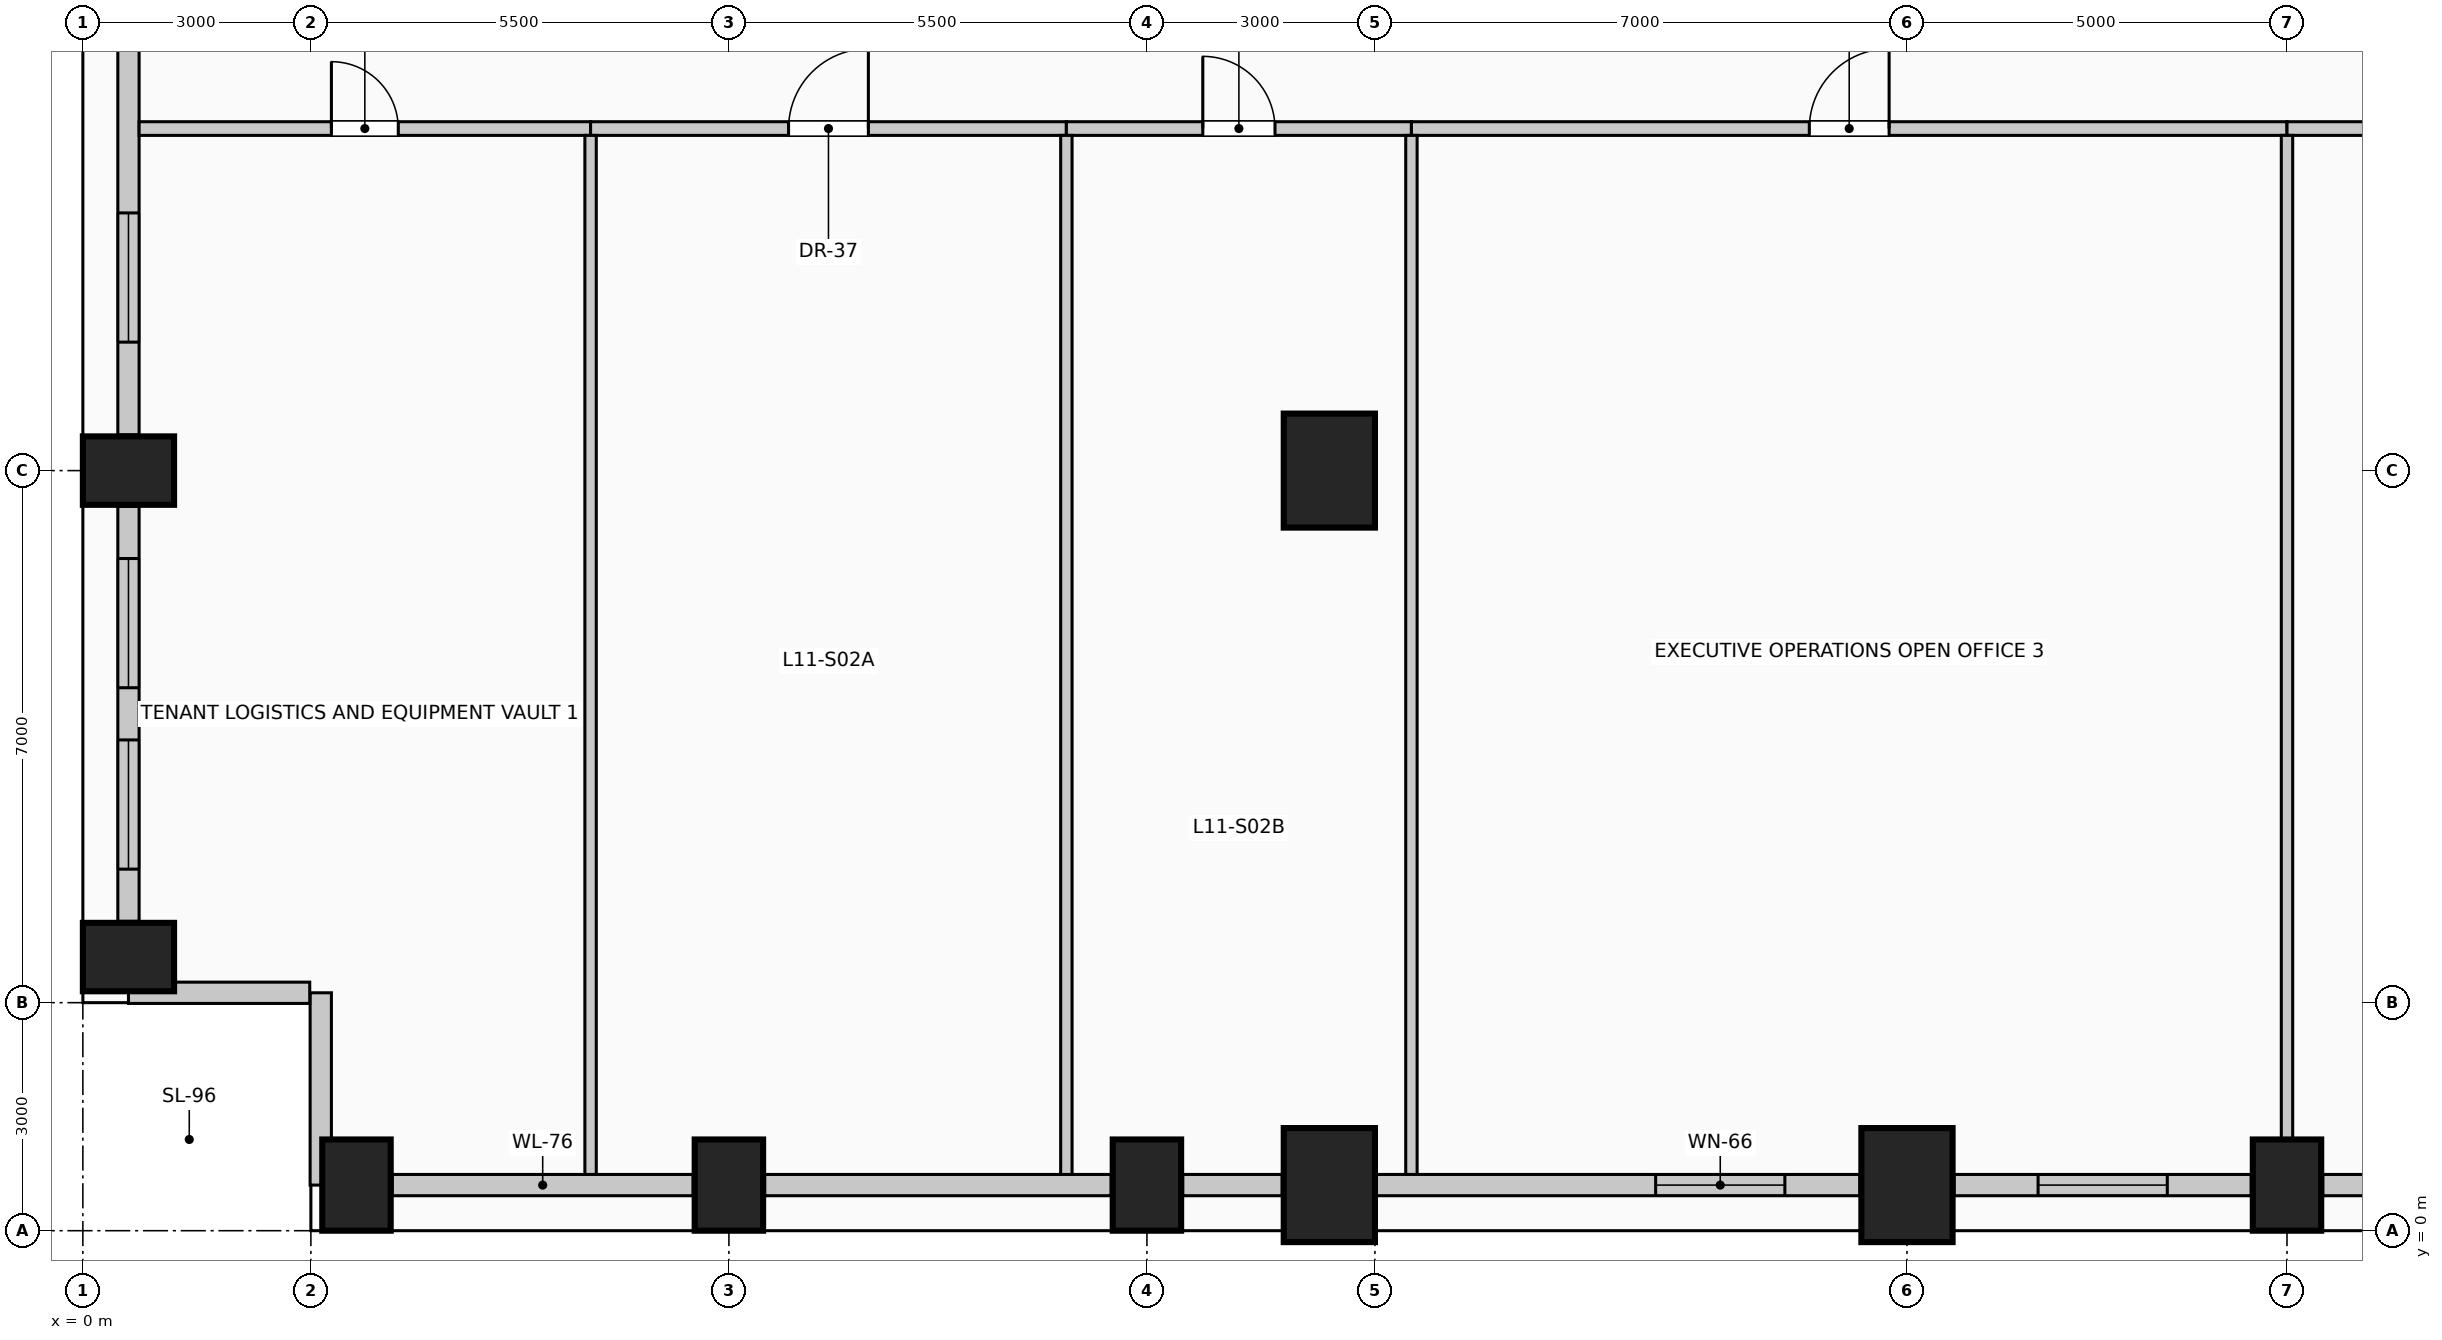
"""IFC4 building model, lengths in metres.
Left out: names, types, materials, properties, quantities, classifications, styles, units other than length and angle.
Written with IfcOpenShell. Run it as: python <this file> out.ifc"""

import sys

from ifc_helpers import new_model, si_unit, direction, frame, frame_2d, origin, origin_2d, place, context, subcontext, project, spatial, rectangle, extrude, element, fill, save


model = new_model("IFC4")
c1 = context("Model", 3, precision=1e-05, world=origin(), true_north=direction((0.0, 1.0)))
c2 = subcontext(c1, "Body", "Model", "MODEL_VIEW")
j1 = project(units=[si_unit("LENGTHUNIT", "METRE"), si_unit("PLANEANGLEUNIT", "RADIAN")], contexts=[c1])
p1 = place(None, origin())
s1 = spatial("IfcSite", under=j1, at=p1, CompositionType="ELEMENT")
p2 = place(p1, origin())
s2 = spatial("IfcBuilding", under=s1, at=p2, CompositionType="ELEMENT")
p3 = place(p2, frame((0.0, 0.0, 46.6)))
s3 = spatial("IfcBuildingStorey", under=s2, at=p3, CompositionType="ELEMENT", Elevation=46.6)
for number, where, z_axis, x_axis in (
    (1, (3.6, 0.6, 0.0), (0.0, 0.0, 1.0), (1.0, 0.0, 0.0)),
    (2, (8.5, 0.6, 0.0), (0.0, 0.0, 1.0), (1.0, 0.0, 0.0)),
    (3, (14.0, 0.6, 0.0), (0.0, 0.0, 1.0), (1.0, 0.0, 0.0)),
):
    element("IfcColumn", number, at=place(p3, frame(where, z_axis=z_axis, x_axis=x_axis)), inside=s3, PredefinedType="COLUMN", context=c2, shape_type="SweptSolid", body=[
        extrude(rectangle(XDim=0.9, YDim=1.2, at=origin_2d()), origin(), (0.0, 0.0, 1.0), 4.0),
    ])
for number, where, z_axis, x_axis in (
    (4, (16.4, 0.6, 0.0), (0.0, 0.0, 1.0), (1.0, 0.0, 0.0)),
    (5, (24.0, 0.6, 0.0), (0.0, 0.0, 1.0), (1.0, 0.0, 0.0)),
):
    element("IfcColumn", number, at=place(p3, frame(where, z_axis=z_axis, x_axis=x_axis)), inside=s3, PredefinedType="COLUMN", context=c2, shape_type="SweptSolid", body=[
        extrude(rectangle(XDim=1.2, YDim=1.5, at=origin_2d()), origin(), (0.0, 0.0, 1.0), 4.0),
    ])
for number, where, z_axis, x_axis in (
    (6, (29.0, 0.6, 0.0), (0.0, 0.0, 1.0), (1.0, 0.0, 0.0)),
    (7, (0.6, 3.6, 0.0), (0.0, 0.0, 1.0), (0.0, 1.0, 0.0)),
    (8, (0.6, 10.0, 0.0), (0.0, 0.0, 1.0), (0.0, 1.0, 0.0)),
):
    element("IfcColumn", number, at=place(p3, frame(where, z_axis=z_axis, x_axis=x_axis)), inside=s3, PredefinedType="COLUMN", context=c2, shape_type="SweptSolid", body=[
        extrude(rectangle(XDim=0.9, YDim=1.2, at=origin_2d()), origin(), (0.0, 0.0, 1.0), 4.0),
    ])
p4 = place(p3, frame((16.4, 10.0, 0.0), z_axis=(0.0, 0.0, 1.0), x_axis=(1.0, 0.0, 0.0)))
e9 = element("IfcColumn", 9, at=p4, inside=s3, PredefinedType="COLUMN", context=c2, shape_type="SweptSolid", body=[
    extrude(rectangle(XDim=1.2, YDim=1.5, at=origin_2d()), origin(), (0.0, 0.0, 1.0), 4.0),
])
p5 = place(p3, frame((8.03, 0.6, 0.0), z_axis=(0.0, 0.0, 1.0), x_axis=(-1.0, 0.0, 0.0)))
e10 = element("IfcWall", 10, at=p5, inside=s3, PredefinedType="SOLIDWALL", context=c2, shape_type="SweptSolid", body=[
    extrude(rectangle(XDim=3.96, YDim=0.28, at=frame_2d((1.98, 0.0))), origin(), (0.0, 0.0, 1.0), 2.85),
])
p6 = place(p3, frame((13.53, 0.6, 0.0), z_axis=(0.0, 0.0, 1.0), x_axis=(-1.0, 0.0, 0.0)))
e11 = element("IfcWall", 11, at=p6, inside=s3, PredefinedType="SOLIDWALL", context=c2, shape_type="SweptSolid", body=[
    extrude(rectangle(XDim=4.56, YDim=0.28, at=frame_2d((2.28, 0.0))), origin(), (0.0, 0.0, 1.0), 2.85),
])
p7 = place(p3, frame((15.78, 0.6, 0.0), z_axis=(0.0, 0.0, 1.0), x_axis=(-1.0, 0.0, 0.0)))
e12 = element("IfcWall", 12, at=p7, inside=s3, PredefinedType="SOLIDWALL", context=c2, shape_type="SweptSolid", body=[
    extrude(rectangle(XDim=1.31, YDim=0.28, at=frame_2d((0.655, 0.0))), origin(), (0.0, 0.0, 1.0), 2.85),
])
p8 = place(p3, frame((23.38, 0.6, 0.0), z_axis=(0.0, 0.0, 1.0), x_axis=(-1.0, 0.0, 0.0)))
e13 = element("IfcWall", 13, at=p8, inside=s3, PredefinedType="SOLIDWALL", context=c2, shape_type="SweptSolid", body=[
    extrude(rectangle(XDim=6.36, YDim=0.28, at=frame_2d((3.18, 0.0))), origin(), (0.0, 0.0, 1.0), 2.85),
])
p9 = place(p8, frame((0.987, 0.0, 0.5)))
e14 = element("IfcOpeningElement", 14, at=p9, cuts=e13, PredefinedType="OPENING", context=c2, shape_type="SweptSolid", body=[
    extrude(rectangle(XDim=1.7, YDim=1.95, at=frame_2d((0.85, 0.975))), frame((0.0, 0.15, 0.0), z_axis=(0.0, -1.0, 0.0), x_axis=(1.0, 0.0, 0.0)), (0.0, 0.0, 1.0), 0.3),
])
p10 = place(p3, frame((28.53, 0.6, 0.0), z_axis=(0.0, 0.0, 1.0), x_axis=(-1.0, 0.0, 0.0)))
e15 = element("IfcWall", 15, at=p10, inside=s3, PredefinedType="SOLIDWALL", context=c2, shape_type="SweptSolid", body=[
    extrude(rectangle(XDim=3.91, YDim=0.28, at=frame_2d((1.955, 0.0))), origin(), (0.0, 0.0, 1.0), 2.85),
])
p11 = place(p10, frame((1.105, 0.0, 0.5)))
e16 = element("IfcOpeningElement", 16, at=p11, cuts=e15, PredefinedType="OPENING", context=c2, shape_type="SweptSolid", body=[
    extrude(rectangle(XDim=1.7, YDim=1.95, at=frame_2d((0.85, 0.975))), frame((0.0, 0.15, 0.0), z_axis=(0.0, -1.0, 0.0), x_axis=(1.0, 0.0, 0.0)), (0.0, 0.0, 1.0), 0.3),
])
p12 = place(p3, frame((33.38, 0.6, 0.0), z_axis=(0.0, 0.0, 1.0), x_axis=(-1.0, 0.0, 0.0)))
e17 = element("IfcWall", 17, at=p12, inside=s3, PredefinedType="SOLIDWALL", context=c2, shape_type="SweptSolid", body=[
    extrude(rectangle(XDim=3.91, YDim=0.28, at=frame_2d((1.955, 0.0))), origin(), (0.0, 0.0, 1.0), 2.85),
])
p13 = place(p12, frame((1.105, 0.0, 0.5)))
e18 = element("IfcOpeningElement", 18, at=p13, cuts=e17, PredefinedType="OPENING", context=c2, shape_type="SweptSolid", body=[
    extrude(rectangle(XDim=1.7, YDim=1.95, at=frame_2d((0.85, 0.975))), frame((0.0, 0.15, 0.0), z_axis=(0.0, -1.0, 0.0), x_axis=(1.0, 0.0, 0.0)), (0.0, 0.0, 1.0), 0.3),
])
p14 = place(p3, frame((0.6, 4.07, 0.0), z_axis=(0.0, 0.0, 1.0), x_axis=(0.0, 1.0, 0.0)))
e19 = element("IfcWall", 19, at=p14, inside=s3, PredefinedType="SOLIDWALL", context=c2, shape_type="SweptSolid", body=[
    extrude(rectangle(XDim=5.46, YDim=0.28, at=frame_2d((2.73, 0.0))), origin(), (0.0, 0.0, 1.0), 2.85),
])
p15 = place(p14, frame((0.687, 0.0, 0.5)))
e20 = element("IfcOpeningElement", 20, at=p15, cuts=e19, PredefinedType="OPENING", context=c2, shape_type="SweptSolid", body=[
    extrude(rectangle(XDim=1.7, YDim=1.95, at=frame_2d((0.85, 0.975))), frame((0.0, 0.15, 0.0), z_axis=(0.0, -1.0, 0.0), x_axis=(1.0, 0.0, 0.0)), (0.0, 0.0, 1.0), 0.3),
])
p16 = place(p14, frame((3.073, 0.0, 0.5)))
e21 = element("IfcOpeningElement", 21, at=p16, cuts=e19, PredefinedType="OPENING", context=c2, shape_type="SweptSolid", body=[
    extrude(rectangle(XDim=1.7, YDim=1.95, at=frame_2d((0.85, 0.975))), frame((0.0, 0.15, 0.0), z_axis=(0.0, -1.0, 0.0), x_axis=(1.0, 0.0, 0.0)), (0.0, 0.0, 1.0), 0.3),
])
p17 = place(p3, frame((0.6, 10.47, 0.0), z_axis=(0.0, 0.0, 1.0), x_axis=(0.0, 1.0, 0.0)))
e22 = element("IfcWall", 22, at=p17, inside=s3, PredefinedType="SOLIDWALL", context=c2, shape_type="SweptSolid", body=[
    extrude(rectangle(XDim=7.06, YDim=0.28, at=frame_2d((3.53, 0.0))), origin(), (0.0, 0.0, 1.0), 2.85),
])
p18 = place(p17, frame((1.22, 0.0, 0.5)))
e23 = element("IfcOpeningElement", 23, at=p18, cuts=e22, PredefinedType="OPENING", context=c2, shape_type="SweptSolid", body=[
    extrude(rectangle(XDim=1.7, YDim=1.95, at=frame_2d((0.85, 0.975))), frame((0.0, 0.15, 0.0), z_axis=(0.0, -1.0, 0.0), x_axis=(1.0, 0.0, 0.0)), (0.0, 0.0, 1.0), 0.3),
])
p19 = place(p3, frame((3.13, 0.6, 0.0), z_axis=(0.0, 0.0, 1.0), x_axis=(0.0, 1.0, 0.0)))
e24 = element("IfcWall", 24, at=p19, inside=s3, PredefinedType="SOLIDWALL", context=c2, shape_type="SweptSolid", body=[
    extrude(rectangle(XDim=2.53, YDim=0.28, at=frame_2d((1.265, 0.0))), origin(), (0.0, 0.0, 1.0), 3.7),
])
p20 = place(p3, frame((2.985, 3.13, 0.0), z_axis=(0.0, 0.0, 1.0), x_axis=(-1.0, 0.0, 0.0)))
e25 = element("IfcWall", 25, at=p20, inside=s3, PredefinedType="SOLIDWALL", context=c2, shape_type="SweptSolid", body=[
    extrude(rectangle(XDim=2.385, YDim=0.28, at=frame_2d((1.192, 0.0))), origin(), (0.0, 0.0, 1.0), 3.7),
])
p21 = place(p3, frame((0.74, 14.5, 0.0), z_axis=(0.0, 0.0, 1.0), x_axis=(1.0, 0.0, 0.0)))
e26 = element("IfcWall", 26, at=p21, inside=s3, PredefinedType="PARTITIONING", context=c2, shape_type="SweptSolid", body=[
    extrude(rectangle(XDim=5.94, YDim=0.18, at=frame_2d((2.97, 0.0))), origin(), (0.0, 0.0, 1.0), 3.7),
])
p22 = place(p21, frame((2.53, 0.0, 0.0)))
e27 = element("IfcOpeningElement", 27, at=p22, cuts=e26, PredefinedType="OPENING", context=c2, shape_type="SweptSolid", body=[
    extrude(rectangle(XDim=0.88, YDim=2.1, at=frame_2d((0.44, 1.05))), frame((0.0, 0.1, 0.0), z_axis=(0.0, -1.0, 0.0), x_axis=(1.0, 0.0, 0.0)), (0.0, 0.0, 1.0), 0.2),
])
p23 = place(p3, frame((6.68, 14.5, 0.0), z_axis=(0.0, 0.0, 1.0), x_axis=(1.0, 0.0, 0.0)))
e28 = element("IfcWall", 28, at=p23, inside=s3, PredefinedType="PARTITIONING", context=c2, shape_type="SweptSolid", body=[
    extrude(rectangle(XDim=6.26, YDim=0.18, at=frame_2d((3.13, 0.0))), origin(), (0.0, 0.0, 1.0), 3.7),
])
p24 = place(p23, frame((2.605, 0.0, 0.0)))
e29 = element("IfcOpeningElement", 29, at=p24, cuts=e28, PredefinedType="OPENING", context=c2, shape_type="SweptSolid", body=[
    extrude(rectangle(XDim=1.05, YDim=2.15, at=frame_2d((0.525, 1.075))), frame((0.0, 0.1, 0.0), z_axis=(0.0, -1.0, 0.0), x_axis=(1.0, 0.0, 0.0)), (0.0, 0.0, 1.0), 0.2),
])
p25 = place(p3, frame((12.94, 14.5, 0.0), z_axis=(0.0, 0.0, 1.0), x_axis=(1.0, 0.0, 0.0)))
e30 = element("IfcWall", 30, at=p25, inside=s3, PredefinedType="PARTITIONING", context=c2, shape_type="SweptSolid", body=[
    extrude(rectangle(XDim=4.54, YDim=0.18, at=frame_2d((2.27, 0.0))), origin(), (0.0, 0.0, 1.0), 3.7),
])
p26 = place(p25, frame((1.795, 0.0, 0.0)))
e31 = element("IfcOpeningElement", 31, at=p26, cuts=e30, PredefinedType="OPENING", context=c2, shape_type="SweptSolid", body=[
    extrude(rectangle(XDim=0.95, YDim=2.15, at=frame_2d((0.475, 1.075))), frame((0.0, 0.1, 0.0), z_axis=(0.0, -1.0, 0.0), x_axis=(1.0, 0.0, 0.0)), (0.0, 0.0, 1.0), 0.2),
])
p27 = place(p3, frame((17.48, 14.5, 0.0), z_axis=(0.0, 0.0, 1.0), x_axis=(1.0, 0.0, 0.0)))
e32 = element("IfcWall", 32, at=p27, inside=s3, PredefinedType="PARTITIONING", context=c2, shape_type="SweptSolid", body=[
    extrude(rectangle(XDim=11.52, YDim=0.18, at=frame_2d((5.76, 0.0))), origin(), (0.0, 0.0, 1.0), 3.7),
])
p28 = place(p27, frame((5.235, 0.0, 0.0)))
e33 = element("IfcOpeningElement", 33, at=p28, cuts=e32, PredefinedType="OPENING", context=c2, shape_type="SweptSolid", body=[
    extrude(rectangle(XDim=1.05, YDim=2.15, at=frame_2d((0.525, 1.075))), frame((0.0, 0.1, 0.0), z_axis=(0.0, -1.0, 0.0), x_axis=(1.0, 0.0, 0.0)), (0.0, 0.0, 1.0), 0.2),
])
p29 = place(p3, frame((29.0, 14.5, 0.0), z_axis=(0.0, 0.0, 1.0), x_axis=(1.0, 0.0, 0.0)))
e34 = element("IfcWall", 34, at=p29, inside=s3, PredefinedType="PARTITIONING", context=c2, shape_type="SweptSolid", body=[
    extrude(rectangle(XDim=12.6, YDim=0.18, at=frame_2d((6.3, 0.0))), origin(), (0.0, 0.0, 1.0), 3.7),
])
p30 = place(p29, frame((5.825, 0.0, 0.0)))
e35 = element("IfcOpeningElement", 35, at=p30, cuts=e34, PredefinedType="OPENING", context=c2, shape_type="SweptSolid", body=[
    extrude(rectangle(XDim=0.95, YDim=2.15, at=frame_2d((0.475, 1.075))), frame((0.0, 0.1, 0.0), z_axis=(0.0, -1.0, 0.0), x_axis=(1.0, 0.0, 0.0)), (0.0, 0.0, 1.0), 0.2),
])
for number, where, z_axis, x_axis in (
    (36, (6.68, 0.74, 0.0), (0.0, 0.0, 1.0), (0.0, 1.0, 0.0)),
    (37, (12.94, 0.74, 0.0), (0.0, 0.0, 1.0), (0.0, 1.0, 0.0)),
    (38, (17.48, 0.74, 0.0), (0.0, 0.0, 1.0), (0.0, 1.0, 0.0)),
):
    element("IfcWall", number, at=place(p3, frame(where, z_axis=z_axis, x_axis=x_axis)), inside=s3, PredefinedType="PARTITIONING", context=c2, shape_type="SweptSolid", body=[
        extrude(rectangle(XDim=13.67, YDim=0.15, at=frame_2d((6.835, 0.0))), origin(), (0.0, 0.0, 1.0), 3.7),
    ])
p31 = place(p3, frame((29.0, 1.2, 0.0), z_axis=(0.0, 0.0, 1.0), x_axis=(0.0, 1.0, 0.0)))
e39 = element("IfcWall", 39, at=p31, inside=s3, PredefinedType="PARTITIONING", context=c2, shape_type="SweptSolid", body=[
    extrude(rectangle(XDim=13.21, YDim=0.15, at=frame_2d((6.605, 0.0))), origin(), (0.0, 0.0, 1.0), 2.995),
])
p32 = place(p9, origin())
e40 = element("IfcWindow", 40, at=p32, inside=s3, PartitioningType="SINGLE_PANEL", PredefinedType="WINDOW", context=c2, shape_type="SweptSolid", body=[
    extrude(rectangle(XDim=1.7, YDim=1.95, at=frame_2d((0.85, 0.975))), frame((0.0, 0.03, 0.0), z_axis=(0.0, -1.0, 0.0), x_axis=(1.0, 0.0, 0.0)), (0.0, 0.0, 1.0), 0.06),
])
fill(e14, e40)
p33 = place(p11, origin())
e41 = element("IfcWindow", 41, at=p33, inside=s3, PartitioningType="SINGLE_PANEL", PredefinedType="WINDOW", context=c2, shape_type="SweptSolid", body=[
    extrude(rectangle(XDim=1.7, YDim=1.95, at=frame_2d((0.85, 0.975))), frame((0.0, 0.03, 0.0), z_axis=(0.0, -1.0, 0.0), x_axis=(1.0, 0.0, 0.0)), (0.0, 0.0, 1.0), 0.06),
])
fill(e16, e41)
p34 = place(p15, origin())
e42 = element("IfcWindow", 42, at=p34, inside=s3, PartitioningType="SINGLE_PANEL", PredefinedType="WINDOW", context=c2, shape_type="SweptSolid", body=[
    extrude(rectangle(XDim=1.7, YDim=1.95, at=frame_2d((0.85, 0.975))), frame((0.0, 0.03, 0.0), z_axis=(0.0, -1.0, 0.0), x_axis=(1.0, 0.0, 0.0)), (0.0, 0.0, 1.0), 0.06),
])
fill(e20, e42)
p35 = place(p16, origin())
e43 = element("IfcWindow", 43, at=p35, inside=s3, PartitioningType="SINGLE_PANEL", PredefinedType="WINDOW", context=c2, shape_type="SweptSolid", body=[
    extrude(rectangle(XDim=1.7, YDim=1.95, at=frame_2d((0.85, 0.975))), frame((0.0, 0.03, 0.0), z_axis=(0.0, -1.0, 0.0), x_axis=(1.0, 0.0, 0.0)), (0.0, 0.0, 1.0), 0.06),
])
fill(e21, e43)
p36 = place(p18, origin())
e44 = element("IfcWindow", 44, at=p36, inside=s3, PartitioningType="SINGLE_PANEL", PredefinedType="WINDOW", context=c2, shape_type="SweptSolid", body=[
    extrude(rectangle(XDim=1.7, YDim=1.95, at=frame_2d((0.85, 0.975))), frame((0.0, 0.03, 0.0), z_axis=(0.0, -1.0, 0.0), x_axis=(1.0, 0.0, 0.0)), (0.0, 0.0, 1.0), 0.06),
])
fill(e23, e44)
p37 = place(p22, origin())
e45 = element("IfcDoor", 45, at=p37, inside=s3, OperationType="SINGLE_SWING_LEFT", PredefinedType="DOOR", context=c2, shape_type="SweptSolid", body=[
    extrude(rectangle(XDim=0.88, YDim=2.1, at=frame_2d((0.44, 1.05))), frame((0.0, 0.025, 0.0), z_axis=(0.0, -1.0, 0.0), x_axis=(1.0, 0.0, 0.0)), (0.0, 0.0, 1.0), 0.05),
])
fill(e27, e45)
p38 = place(p24, origin())
e46 = element("IfcDoor", 46, at=p38, inside=s3, OperationType="SINGLE_SWING_RIGHT", PredefinedType="DOOR", context=c2, shape_type="SweptSolid", body=[
    extrude(rectangle(XDim=1.05, YDim=2.15, at=frame_2d((0.525, 1.075))), frame((0.0, 0.025, 0.0), z_axis=(0.0, -1.0, 0.0), x_axis=(1.0, 0.0, 0.0)), (0.0, 0.0, 1.0), 0.05),
])
fill(e29, e46)
p39 = place(p26, origin())
e47 = element("IfcDoor", 47, at=p39, inside=s3, OperationType="SINGLE_SWING_LEFT", PredefinedType="DOOR", context=c2, shape_type="SweptSolid", body=[
    extrude(rectangle(XDim=0.95, YDim=2.15, at=frame_2d((0.475, 1.075))), frame((0.0, 0.025, 0.0), z_axis=(0.0, -1.0, 0.0), x_axis=(1.0, 0.0, 0.0)), (0.0, 0.0, 1.0), 0.05),
])
fill(e31, e47)
p40 = place(p28, origin())
e48 = element("IfcDoor", 48, at=p40, inside=s3, OperationType="SINGLE_SWING_RIGHT", PredefinedType="DOOR", context=c2, shape_type="SweptSolid", body=[
    extrude(rectangle(XDim=1.05, YDim=2.15, at=frame_2d((0.525, 1.075))), frame((0.0, 0.025, 0.0), z_axis=(0.0, -1.0, 0.0), x_axis=(1.0, 0.0, 0.0)), (0.0, 0.0, 1.0), 0.05),
])
fill(e33, e48)
save(model, sys.argv[1])
